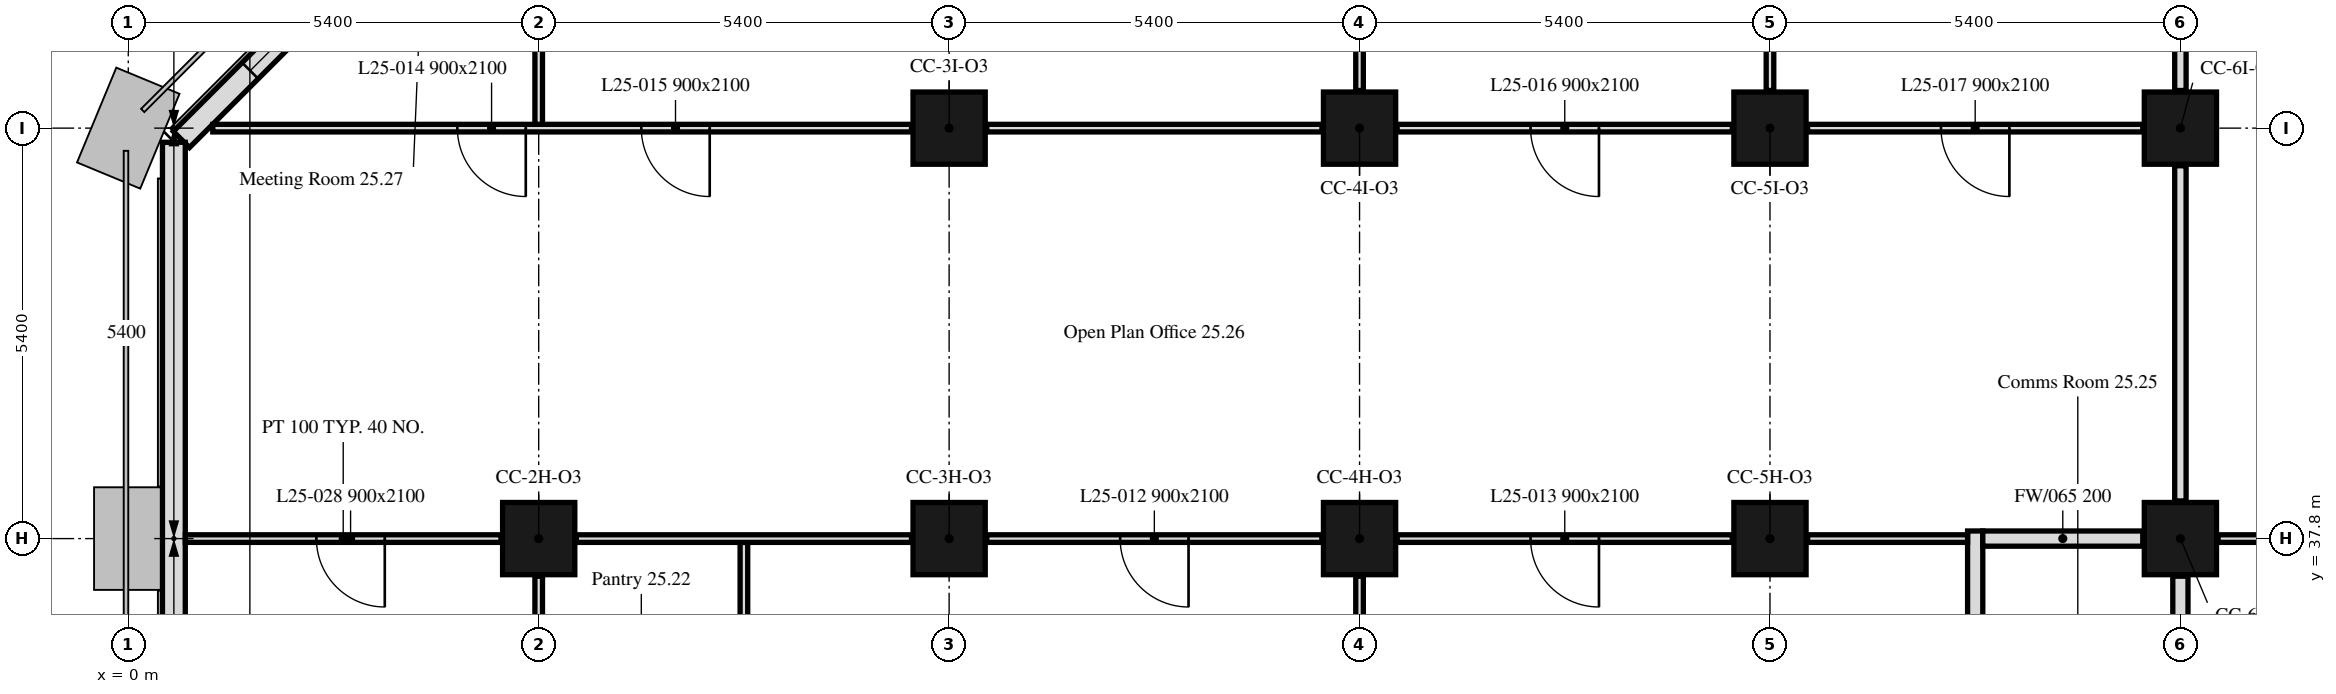
"""IFC4 building model, lengths in metres.
Left out: names, types, materials, properties, quantities, classifications, styles, units other than length and angle.
Written with IfcOpenShell. Run it as: python <this file> out.ifc"""

import sys

from ifc_helpers import new_model, si_unit, direction, frame, frame_2d, origin, origin_2d, place, context, subcontext, project, spatial, rectangle, extrude, element, fill, save


model = new_model("IFC4")
c1 = context("Model", 3, precision=1e-05, world=origin(), true_north=direction((0.0, 1.0)))
c2 = subcontext(c1, "Body", "Model", "MODEL_VIEW")
j1 = project(units=[si_unit("LENGTHUNIT", "METRE"), si_unit("PLANEANGLEUNIT", "RADIAN")], contexts=[c1])
p1 = place(None, origin())
s1 = spatial("IfcSite", under=j1, at=p1, CompositionType="ELEMENT")
p2 = place(p1, origin())
s2 = spatial("IfcBuilding", under=s1, at=p2, CompositionType="ELEMENT")
p3 = place(p2, frame((0.0, 0.0, 106.8)))
s3 = spatial("IfcBuildingStorey", under=s2, at=p3, CompositionType="ELEMENT", Elevation=106.8)
for number, where, z_axis, x_axis in (
    (1, (5.4, 37.8, 0.0), (0.0, 0.0, 1.0), (1.0, 0.0, 0.0)),
    (2, (10.8, 37.8, 0.0), (0.0, 0.0, 1.0), (1.0, 0.0, 0.0)),
    (3, (16.2, 37.8, 0.0), (0.0, 0.0, 1.0), (1.0, 0.0, 0.0)),
    (4, (21.6, 37.8, 0.0), (0.0, 0.0, 1.0), (1.0, 0.0, 0.0)),
    (5, (27.0, 37.8, 0.0), (0.0, 0.0, 1.0), (1.0, 0.0, 0.0)),
    (6, (10.8, 43.2, 0.0), (0.0, 0.0, 1.0), (1.0, 0.0, 0.0)),
    (7, (16.2, 43.2, 0.0), (0.0, 0.0, 1.0), (1.0, 0.0, 0.0)),
    (8, (21.6, 43.2, 0.0), (0.0, 0.0, 1.0), (1.0, 0.0, 0.0)),
    (9, (27.0, 43.2, 0.0), (0.0, 0.0, 1.0), (1.0, 0.0, 0.0)),
):
    element("IfcColumn", number, at=place(p3, frame(where, z_axis=z_axis, x_axis=x_axis)), inside=s3, PredefinedType="COLUMN", context=c2, shape_type="SweptSolid", body=[
        extrude(rectangle(XDim=0.95, YDim=0.95, at=origin_2d()), origin(), (0.0, 0.0, 1.0), 3.5),
    ])
p4 = place(p3, frame((5.55, 47.901, 0.0), z_axis=(0.0, 0.0, 1.0), x_axis=(-0.707106781187, -0.707106781187, 0.0)))
e10 = element("IfcWall", 10, at=p4, inside=s3, PredefinedType="SOLIDWALL", context=c2, shape_type="SweptSolid", body=[
    extrude(rectangle(XDim=6.86, YDim=0.3, at=frame_2d((3.43, 0.0))), origin(), (0.0, 0.0, 1.0), 3.5),
])
p5 = place(p4, frame((1.28, 0.0, 0.9)))
e11 = element("IfcOpeningElement", 11, at=p5, cuts=e10, PredefinedType="OPENING", context=c2, shape_type="SweptSolid", body=[
    extrude(rectangle(XDim=1.1, YDim=1.7, at=frame_2d((0.55, 0.85))), frame((0.0, 0.16, 0.0), z_axis=(0.0, -1.0, 0.0), x_axis=(1.0, 0.0, 0.0)), (0.0, 0.0, 1.0), 0.32),
])
p6 = place(p4, frame((4.48, 0.0, 0.9)))
e12 = element("IfcOpeningElement", 12, at=p6, cuts=e10, PredefinedType="OPENING", context=c2, shape_type="SweptSolid", body=[
    extrude(rectangle(XDim=1.1, YDim=1.7, at=frame_2d((0.55, 0.85))), frame((0.0, 0.16, 0.0), z_axis=(0.0, -1.0, 0.0), x_axis=(1.0, 0.0, 0.0)), (0.0, 0.0, 1.0), 0.32),
])
p7 = place(p3, frame((0.6, 43.014, 0.0), z_axis=(0.0, 0.0, 1.0), x_axis=(0.0, -1.0, 0.0)))
e13 = element("IfcWall", 13, at=p7, inside=s3, PredefinedType="SOLIDWALL", context=c2, shape_type="SweptSolid", body=[
    extrude(rectangle(XDim=32.027, YDim=0.3, at=frame_2d((16.014, 0.0))), origin(), (0.0, 0.0, 1.0), 3.5),
])
p8 = place(p7, frame((6.564, 0.0, 0.9)))
e14 = element("IfcOpeningElement", 14, at=p8, cuts=e13, PredefinedType="OPENING", context=c2, shape_type="SweptSolid", body=[
    extrude(rectangle(XDim=1.1, YDim=1.7, at=frame_2d((0.55, 0.85))), frame((0.0, 0.16, 0.0), z_axis=(0.0, -1.0, 0.0), x_axis=(1.0, 0.0, 0.0)), (0.0, 0.0, 1.0), 0.32),
])
p9 = place(p7, frame((8.164, 0.0, 0.9)))
e15 = element("IfcOpeningElement", 15, at=p9, cuts=e13, PredefinedType="OPENING", context=c2, shape_type="SweptSolid", body=[
    extrude(rectangle(XDim=1.1, YDim=1.7, at=frame_2d((0.55, 0.85))), frame((0.0, 0.16, 0.0), z_axis=(0.0, -1.0, 0.0), x_axis=(1.0, 0.0, 0.0)), (0.0, 0.0, 1.0), 0.32),
])
p10 = place(p7, frame((17.014, 0.0, 0.9)))
e16 = element("IfcOpeningElement", 16, at=p10, cuts=e13, PredefinedType="OPENING", context=c2, shape_type="SweptSolid", body=[
    extrude(rectangle(XDim=3.4, YDim=1.7, at=frame_2d((1.7, 0.85))), frame((0.0, 0.16, 0.0), z_axis=(0.0, -1.0, 0.0), x_axis=(1.0, 0.0, 0.0)), (0.0, 0.0, 1.0), 0.32),
])
p11 = place(p7, frame((28.164, 0.0, 0.9)))
e17 = element("IfcOpeningElement", 17, at=p11, cuts=e13, PredefinedType="OPENING", context=c2, shape_type="SweptSolid", body=[
    extrude(rectangle(XDim=1.1, YDim=1.7, at=frame_2d((0.55, 0.85))), frame((0.0, 0.16, 0.0), z_axis=(0.0, -1.0, 0.0), x_axis=(1.0, 0.0, 0.0)), (0.0, 0.0, 1.0), 0.32),
])
p12 = place(p7, frame((29.764, 0.0, 0.9)))
e18 = element("IfcOpeningElement", 18, at=p12, cuts=e13, PredefinedType="OPENING", context=c2, shape_type="SweptSolid", body=[
    extrude(rectangle(XDim=1.1, YDim=1.7, at=frame_2d((0.55, 0.85))), frame((0.0, 0.16, 0.0), z_axis=(0.0, -1.0, 0.0), x_axis=(1.0, 0.0, 0.0)), (0.0, 0.0, 1.0), 0.32),
])
p13 = place(p3, frame((4.905, 37.8, 0.0), z_axis=(0.0, 0.0, 1.0), x_axis=(-1.0, 0.0, 0.0)))
e19 = element("IfcWall", 19, at=p13, inside=s3, PredefinedType="PARTITIONING", context=c2, shape_type="SweptSolid", body=[
    extrude(rectangle(XDim=4.154, YDim=0.1, at=frame_2d((2.077, 0.0))), origin(), (0.0, 0.0, 1.0), 2.75),
])
p14 = place(p13, frame((1.53, 0.0, 0.0)))
e20 = element("IfcOpeningElement", 20, at=p14, cuts=e19, PredefinedType="OPENING", context=c2, shape_type="SweptSolid", body=[
    extrude(rectangle(XDim=0.9, YDim=2.1, at=frame_2d((0.45, 1.05))), frame((0.0, 0.05, 0.0), z_axis=(0.0, -1.0, 0.0), x_axis=(1.0, 0.0, 0.0)), (0.0, 0.0, 1.0), 0.1),
])
p15 = place(p3, frame((5.4, 35.175, 0.0), z_axis=(0.0, 0.0, 1.0), x_axis=(0.0, 1.0, 0.0)))
e21 = element("IfcWall", 21, at=p15, inside=s3, PredefinedType="PARTITIONING", context=c2, shape_type="SweptSolid", body=[
    extrude(rectangle(XDim=2.13, YDim=0.1, at=frame_2d((1.065, 0.0))), origin(), (0.0, 0.0, 1.0), 3.5),
])
p16 = place(p3, frame((8.1, 35.175, 0.0), z_axis=(0.0, 0.0, 1.0), x_axis=(0.0, 1.0, 0.0)))
e22 = element("IfcWall", 22, at=p16, inside=s3, PredefinedType="PARTITIONING", context=c2, shape_type="SweptSolid", body=[
    extrude(rectangle(XDim=2.575, YDim=0.1, at=frame_2d((1.288, 0.0))), origin(), (0.0, 0.0, 1.0), 3.5),
])
p17 = place(p3, frame((16.2, 35.175, 0.0), z_axis=(0.0, 0.0, 1.0), x_axis=(0.0, 1.0, 0.0)))
e23 = element("IfcWall", 23, at=p17, inside=s3, PredefinedType="PARTITIONING", context=c2, shape_type="SweptSolid", body=[
    extrude(rectangle(XDim=2.13, YDim=0.1, at=frame_2d((1.065, 0.0))), origin(), (0.0, 0.0, 1.0), 2.75),
])
p18 = place(p3, frame((15.705, 37.8, 0.0), z_axis=(0.0, 0.0, 1.0), x_axis=(-1.0, 0.0, 0.0)))
e24 = element("IfcWall", 24, at=p18, inside=s3, PredefinedType="PARTITIONING", context=c2, shape_type="SweptSolid", body=[
    extrude(rectangle(XDim=4.41, YDim=0.1, at=frame_2d((2.205, 0.0))), origin(), (0.0, 0.0, 1.0), 2.75),
])
p19 = place(p18, frame((1.755, 0.0, 0.0)))
e25 = element("IfcOpeningElement", 25, at=p19, cuts=e24, PredefinedType="OPENING", context=c2, shape_type="SweptSolid", body=[
    extrude(rectangle(XDim=0.9, YDim=2.1, at=frame_2d((0.45, 1.05))), frame((0.0, 0.05, 0.0), z_axis=(0.0, -1.0, 0.0), x_axis=(1.0, 0.0, 0.0)), (0.0, 0.0, 1.0), 0.1),
])
p20 = place(p3, frame((10.305, 37.8, 0.0), z_axis=(0.0, 0.0, 1.0), x_axis=(-1.0, 0.0, 0.0)))
e26 = element("IfcWall", 26, at=p20, inside=s3, PredefinedType="PARTITIONING", context=c2, shape_type="SweptSolid", body=[
    extrude(rectangle(XDim=4.41, YDim=0.1, at=frame_2d((2.205, 0.0))), origin(), (0.0, 0.0, 1.0), 2.75),
])
p21 = place(p3, frame((24.3, 35.2, 0.0), z_axis=(0.0, 0.0, 1.0), x_axis=(0.0, 1.0, 0.0)))
e27 = element("IfcWall", 27, at=p21, inside=s3, PredefinedType="PARTITIONING", context=c2, shape_type="SweptSolid", body=[
    extrude(rectangle(XDim=2.7, YDim=0.2, at=frame_2d((1.35, 0.0))), origin(), (0.0, 0.0, 1.0), 3.5),
])
p22 = place(p3, frame((24.2, 37.8, 0.0), z_axis=(0.0, 0.0, 1.0), x_axis=(-1.0, 0.0, 0.0)))
e28 = element("IfcWall", 28, at=p22, inside=s3, PredefinedType="PARTITIONING", context=c2, shape_type="SweptSolid", body=[
    extrude(rectangle(XDim=2.105, YDim=0.1, at=frame_2d((1.052, 0.0))), origin(), (0.0, 0.0, 1.0), 3.5),
])
p23 = place(p3, frame((21.105, 37.8, 0.0), z_axis=(0.0, 0.0, 1.0), x_axis=(-1.0, 0.0, 0.0)))
e29 = element("IfcWall", 29, at=p23, inside=s3, PredefinedType="PARTITIONING", context=c2, shape_type="SweptSolid", body=[
    extrude(rectangle(XDim=4.41, YDim=0.1, at=frame_2d((2.205, 0.0))), origin(), (0.0, 0.0, 1.0), 3.5),
])
p24 = place(p23, frame((1.755, 0.0, 0.0)))
e30 = element("IfcOpeningElement", 30, at=p24, cuts=e29, PredefinedType="OPENING", context=c2, shape_type="SweptSolid", body=[
    extrude(rectangle(XDim=0.9, YDim=2.1, at=frame_2d((0.45, 1.05))), frame((0.0, 0.05, 0.0), z_axis=(0.0, -1.0, 0.0), x_axis=(1.0, 0.0, 0.0)), (0.0, 0.0, 1.0), 0.1),
])
p25 = place(p3, frame((27.0, 35.2, 0.0), z_axis=(0.0, 0.0, 1.0), x_axis=(0.0, 1.0, 0.0)))
e31 = element("IfcWall", 31, at=p25, inside=s3, PredefinedType="PARTITIONING", context=c2, shape_type="SweptSolid", body=[
    extrude(rectangle(XDim=2.105, YDim=0.2, at=frame_2d((1.052, 0.0))), origin(), (0.0, 0.0, 1.0), 2.75),
])
p26 = place(p3, frame((26.505, 37.8, 0.0), z_axis=(0.0, 0.0, 1.0), x_axis=(-1.0, 0.0, 0.0)))
e32 = element("IfcWall", 32, at=p26, inside=s3, PredefinedType="PARTITIONING", context=c2, shape_type="SweptSolid", body=[
    extrude(rectangle(XDim=2.105, YDim=0.2, at=frame_2d((1.052, 0.0))), origin(), (0.0, 0.0, 1.0), 3.5),
])
p27 = place(p3, frame((26.505, 43.2, 0.0), z_axis=(0.0, 0.0, 1.0), x_axis=(-1.0, 0.0, 0.0)))
e33 = element("IfcWall", 33, at=p27, inside=s3, PredefinedType="PARTITIONING", context=c2, shape_type="SweptSolid", body=[
    extrude(rectangle(XDim=4.41, YDim=0.1, at=frame_2d((2.205, 0.0))), origin(), (0.0, 0.0, 1.0), 3.5),
])
p28 = place(p27, frame((1.755, 0.0, 0.0)))
e34 = element("IfcOpeningElement", 34, at=p28, cuts=e33, PredefinedType="OPENING", context=c2, shape_type="SweptSolid", body=[
    extrude(rectangle(XDim=0.9, YDim=2.1, at=frame_2d((0.45, 1.05))), frame((0.0, 0.05, 0.0), z_axis=(0.0, -1.0, 0.0), x_axis=(1.0, 0.0, 0.0)), (0.0, 0.0, 1.0), 0.1),
])
p29 = place(p3, frame((21.105, 43.2, 0.0), z_axis=(0.0, 0.0, 1.0), x_axis=(-1.0, 0.0, 0.0)))
e35 = element("IfcWall", 35, at=p29, inside=s3, PredefinedType="PARTITIONING", context=c2, shape_type="SweptSolid", body=[
    extrude(rectangle(XDim=4.41, YDim=0.1, at=frame_2d((2.205, 0.0))), origin(), (0.0, 0.0, 1.0), 3.5),
])
p30 = place(p29, frame((1.755, 0.0, 0.0)))
e36 = element("IfcOpeningElement", 36, at=p30, cuts=e35, PredefinedType="OPENING", context=c2, shape_type="SweptSolid", body=[
    extrude(rectangle(XDim=0.9, YDim=2.1, at=frame_2d((0.45, 1.05))), frame((0.0, 0.05, 0.0), z_axis=(0.0, -1.0, 0.0), x_axis=(1.0, 0.0, 0.0)), (0.0, 0.0, 1.0), 0.1),
])
p31 = place(p3, frame((15.705, 43.2, 0.0), z_axis=(0.0, 0.0, 1.0), x_axis=(-1.0, 0.0, 0.0)))
e37 = element("IfcWall", 37, at=p31, inside=s3, PredefinedType="PARTITIONING", context=c2, shape_type="SweptSolid", body=[
    extrude(rectangle(XDim=4.41, YDim=0.1, at=frame_2d((2.205, 0.0))), origin(), (0.0, 0.0, 1.0), 3.5),
])
p32 = place(p3, frame((10.305, 43.2, 0.0), z_axis=(0.0, 0.0, 1.0), x_axis=(-1.0, 0.0, 0.0)))
e38 = element("IfcWall", 38, at=p32, inside=s3, PredefinedType="PARTITIONING", context=c2, shape_type="SweptSolid", body=[
    extrude(rectangle(XDim=9.193, YDim=0.1, at=frame_2d((4.596, 0.0))), origin(), (0.0, 0.0, 1.0), 3.5),
])
p33 = place(p32, frame((5.075, 0.0, 0.0)))
e39 = element("IfcOpeningElement", 39, at=p33, cuts=e38, PredefinedType="OPENING", context=c2, shape_type="SweptSolid", body=[
    extrude(rectangle(XDim=0.9, YDim=2.1, at=frame_2d((0.45, 1.05))), frame((0.0, 0.05, 0.0), z_axis=(0.0, -1.0, 0.0), x_axis=(1.0, 0.0, 0.0)), (0.0, 0.0, 1.0), 0.1),
])
p34 = place(p32, frame((2.655, 0.0, 0.0)))
e40 = element("IfcOpeningElement", 40, at=p34, cuts=e38, PredefinedType="OPENING", context=c2, shape_type="SweptSolid", body=[
    extrude(rectangle(XDim=0.9, YDim=2.1, at=frame_2d((0.45, 1.05))), frame((0.0, 0.05, 0.0), z_axis=(0.0, -1.0, 0.0), x_axis=(1.0, 0.0, 0.0)), (0.0, 0.0, 1.0), 0.1),
])
p35 = place(p3, frame((27.0, 38.295, 0.0), z_axis=(0.0, 0.0, 1.0), x_axis=(0.0, 1.0, 0.0)))
e41 = element("IfcWall", 41, at=p35, inside=s3, PredefinedType="PARTITIONING", context=c2, shape_type="SweptSolid", body=[
    extrude(rectangle(XDim=4.41, YDim=0.15, at=frame_2d((2.205, 0.0))), origin(), (0.0, 0.0, 1.0), 2.75),
])
p36 = place(p3, frame((5.4, 43.25, 0.0), z_axis=(0.0, 0.0, 1.0), x_axis=(0.0, 1.0, 0.0)))
e42 = element("IfcWall", 42, at=p36, inside=s3, PredefinedType="PARTITIONING", context=c2, shape_type="SweptSolid", body=[
    extrude(rectangle(XDim=4.238, YDim=0.1, at=frame_2d((2.119, 0.0))), origin(), (0.0, 0.0, 1.0), 3.5),
])
for number, where, z_axis, x_axis in (
    (43, (16.2, 43.695, 0.0), (0.0, 0.0, 1.0), (0.0, 1.0, 0.0)),
    (44, (21.6, 43.695, 0.0), (0.0, 0.0, 1.0), (0.0, 1.0, 0.0)),
):
    element("IfcWall", number, at=place(p3, frame(where, z_axis=z_axis, x_axis=x_axis)), inside=s3, PredefinedType="PARTITIONING", context=c2, shape_type="SweptSolid", body=[
        extrude(rectangle(XDim=4.154, YDim=0.1, at=frame_2d((2.077, 0.0))), origin(), (0.0, 0.0, 1.0), 2.75),
    ])
p37 = place(p3, frame((27.0, 43.695, 0.0), z_axis=(0.0, 0.0, 1.0), x_axis=(0.0, 1.0, 0.0)))
e45 = element("IfcWall", 45, at=p37, inside=s3, PredefinedType="PARTITIONING", context=c2, shape_type="SweptSolid", body=[
    extrude(rectangle(XDim=4.154, YDim=0.15, at=frame_2d((2.077, 0.0))), origin(), (0.0, 0.0, 1.0), 2.75),
])
p38 = place(p3, frame((31.905, 37.8, 0.0), z_axis=(0.0, 0.0, 1.0), x_axis=(-1.0, 0.0, 0.0)))
e46 = element("IfcWall", 46, at=p38, inside=s3, PredefinedType="PARTITIONING", context=c2, shape_type="SweptSolid", body=[
    extrude(rectangle(XDim=4.41, YDim=0.1, at=frame_2d((2.205, 0.0))), origin(), (0.0, 0.0, 1.0), 3.5),
])
p39 = place(p38, frame((1.755, 0.0, 0.0)))
e47 = element("IfcOpeningElement", 47, at=p39, cuts=e46, PredefinedType="OPENING", context=c2, shape_type="SweptSolid", body=[
    extrude(rectangle(XDim=0.9, YDim=2.1, at=frame_2d((0.45, 1.05))), frame((0.0, 0.05, 0.0), z_axis=(0.0, -1.0, 0.0), x_axis=(1.0, 0.0, 0.0)), (0.0, 0.0, 1.0), 0.1),
])
p40 = place(p6, origin())
e48 = element("IfcWindow", 48, at=p40, inside=s3, PartitioningType="SINGLE_PANEL", PredefinedType="WINDOW", context=c2, shape_type="SweptSolid", body=[
    extrude(rectangle(XDim=1.1, YDim=1.7, at=frame_2d((0.55, 0.85))), frame((0.0, 0.03, 0.0), z_axis=(0.0, -1.0, 0.0), x_axis=(1.0, 0.0, 0.0)), (0.0, 0.0, 1.0), 0.06),
])
fill(e12, e48)
p41 = place(p19, origin())
e49 = element("IfcDoor", 49, at=p41, inside=s3, OperationType="SINGLE_SWING_LEFT", PredefinedType="DOOR", context=c2, shape_type="SweptSolid", body=[
    extrude(rectangle(XDim=0.9, YDim=2.1, at=frame_2d((0.45, 1.05))), frame((0.0, 0.025, 0.0), z_axis=(0.0, -1.0, 0.0), x_axis=(1.0, 0.0, 0.0)), (0.0, 0.0, 1.0), 0.05),
])
fill(e25, e49)
p42 = place(p24, origin())
e50 = element("IfcDoor", 50, at=p42, inside=s3, OperationType="SINGLE_SWING_RIGHT", PredefinedType="DOOR", context=c2, shape_type="SweptSolid", body=[
    extrude(rectangle(XDim=0.9, YDim=2.1, at=frame_2d((0.45, 1.05))), frame((0.0, 0.025, 0.0), z_axis=(0.0, -1.0, 0.0), x_axis=(1.0, 0.0, 0.0)), (0.0, 0.0, 1.0), 0.05),
])
fill(e30, e50)
p43 = place(p33, origin())
e51 = element("IfcDoor", 51, at=p43, inside=s3, OperationType="SINGLE_SWING_LEFT", PredefinedType="DOOR", context=c2, shape_type="SweptSolid", body=[
    extrude(rectangle(XDim=0.9, YDim=2.1, at=frame_2d((0.45, 1.05))), frame((0.0, 0.025, 0.0), z_axis=(0.0, -1.0, 0.0), x_axis=(1.0, 0.0, 0.0)), (0.0, 0.0, 1.0), 0.05),
])
fill(e39, e51)
p44 = place(p34, origin())
e52 = element("IfcDoor", 52, at=p44, inside=s3, OperationType="SINGLE_SWING_LEFT", PredefinedType="DOOR", context=c2, shape_type="SweptSolid", body=[
    extrude(rectangle(XDim=0.9, YDim=2.1, at=frame_2d((0.45, 1.05))), frame((0.0, 0.025, 0.0), z_axis=(0.0, -1.0, 0.0), x_axis=(1.0, 0.0, 0.0)), (0.0, 0.0, 1.0), 0.05),
])
fill(e40, e52)
p45 = place(p30, origin())
e53 = element("IfcDoor", 53, at=p45, inside=s3, OperationType="SINGLE_SWING_LEFT", PredefinedType="DOOR", context=c2, shape_type="SweptSolid", body=[
    extrude(rectangle(XDim=0.9, YDim=2.1, at=frame_2d((0.45, 1.05))), frame((0.0, 0.025, 0.0), z_axis=(0.0, -1.0, 0.0), x_axis=(1.0, 0.0, 0.0)), (0.0, 0.0, 1.0), 0.05),
])
fill(e36, e53)
p46 = place(p28, origin())
e54 = element("IfcDoor", 54, at=p46, inside=s3, OperationType="SINGLE_SWING_LEFT", PredefinedType="DOOR", context=c2, shape_type="SweptSolid", body=[
    extrude(rectangle(XDim=0.9, YDim=2.1, at=frame_2d((0.45, 1.05))), frame((0.0, 0.025, 0.0), z_axis=(0.0, -1.0, 0.0), x_axis=(1.0, 0.0, 0.0)), (0.0, 0.0, 1.0), 0.05),
])
fill(e34, e54)
p47 = place(p14, origin())
e55 = element("IfcDoor", 55, at=p47, inside=s3, OperationType="SINGLE_SWING_RIGHT", PredefinedType="DOOR", context=c2, shape_type="SweptSolid", body=[
    extrude(rectangle(XDim=0.9, YDim=2.1, at=frame_2d((0.45, 1.05))), frame((0.0, 0.025, 0.0), z_axis=(0.0, -1.0, 0.0), x_axis=(1.0, 0.0, 0.0)), (0.0, 0.0, 1.0), 0.05),
])
fill(e20, e55)
save(model, sys.argv[1])
